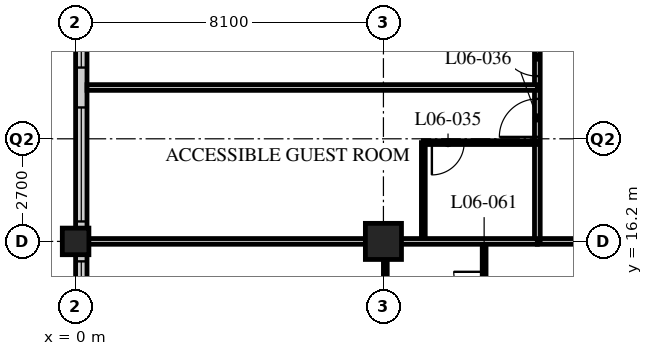
"""IFC4 building model, lengths in metres.
Left out: names, types, materials, properties, quantities, classifications, styles, units other than length and angle.
Written with IfcOpenShell. Run it as: python <this file> out.ifc"""

import sys

from ifc_helpers import new_model, si_unit, direction, frame, frame_2d, origin, origin_2d, place, context, subcontext, project, spatial, rectangle, hollow_rectangle, extrude, element, fill, save


model = new_model("IFC4")
c1 = context("Model", 3, precision=1e-05, world=origin(), true_north=direction((0.0, 1.0)))
c2 = subcontext(c1, "Body", "Model", "MODEL_VIEW")
j1 = project(units=[si_unit("LENGTHUNIT", "METRE"), si_unit("PLANEANGLEUNIT", "RADIAN")], contexts=[c1])
p1 = place(None, origin())
s1 = spatial("IfcSite", under=j1, at=p1, CompositionType="ELEMENT")
p2 = place(p1, origin())
s2 = spatial("IfcBuilding", under=s1, at=p2, CompositionType="ELEMENT")
p3 = place(p2, frame((0.0, 0.0, 33.0)))
s3 = spatial("IfcBuildingStorey", under=s2, at=p3, CompositionType="ELEMENT", Elevation=33.0)
p4 = place(p3, frame((0.0, 16.2, 0.0), z_axis=(0.0, 0.0, 1.0), x_axis=(1.0, 0.0, 0.0)))
e1 = element("IfcColumn", 1, at=p4, inside=s3, PredefinedType="COLUMN", context=c2, shape_type="SweptSolid", body=[
    extrude(hollow_rectangle(XDim=0.7, YDim=0.7, WallThickness=0.06, at=origin_2d()), origin(), (0.0, 0.0, 1.0), 3.4),
])
p5 = place(p3, frame((8.1, 16.2, 0.0), z_axis=(0.0, 0.0, 1.0), x_axis=(1.0, 0.0, 0.0)))
e2 = element("IfcColumn", 2, at=p5, inside=s3, PredefinedType="COLUMN", context=c2, shape_type="SweptSolid", body=[
    extrude(hollow_rectangle(XDim=0.95, YDim=0.95, WallThickness=0.095, at=origin_2d()), origin(), (0.0, 0.0, 1.0), 3.4),
])
p6 = place(p3, frame((0.15, 40.2, 0.0), z_axis=(0.0, 0.0, 1.0), x_axis=(0.0, -1.0, 0.0)))
e3 = element("IfcWall", 3, at=p6, inside=s3, PredefinedType="SOLIDWALL", context=c2, shape_type="SweptSolid", body=[
    extrude(rectangle(XDim=32.1, YDim=0.3, at=frame_2d((16.05, 0.0))), origin(), (0.0, 0.0, 1.0), 3.19),
])
p7 = place(p6, frame((0.225, 0.0, 0.9)))
e4 = element("IfcOpeningElement", 4, at=p7, cuts=e3, PredefinedType="OPENING", context=c2, shape_type="SweptSolid", body=[
    extrude(rectangle(XDim=3.0, YDim=2.0, at=frame_2d((1.5, 1.0))), frame((0.0, 0.16, 0.0), z_axis=(0.0, -1.0, 0.0), x_axis=(1.0, 0.0, 0.0)), (0.0, 0.0, 1.0), 0.32),
])
p8 = place(p6, frame((4.275, 0.0, 0.9)))
e5 = element("IfcOpeningElement", 5, at=p8, cuts=e3, PredefinedType="OPENING", context=c2, shape_type="SweptSolid", body=[
    extrude(rectangle(XDim=3.0, YDim=2.0, at=frame_2d((1.5, 1.0))), frame((0.0, 0.16, 0.0), z_axis=(0.0, -1.0, 0.0), x_axis=(1.0, 0.0, 0.0)), (0.0, 0.0, 1.0), 0.32),
])
p9 = place(p6, frame((8.325, 0.0, 0.9)))
e6 = element("IfcOpeningElement", 6, at=p9, cuts=e3, PredefinedType="OPENING", context=c2, shape_type="SweptSolid", body=[
    extrude(rectangle(XDim=3.0, YDim=2.0, at=frame_2d((1.5, 1.0))), frame((0.0, 0.16, 0.0), z_axis=(0.0, -1.0, 0.0), x_axis=(1.0, 0.0, 0.0)), (0.0, 0.0, 1.0), 0.32),
])
p10 = place(p6, frame((12.375, 0.0, 0.9)))
e7 = element("IfcOpeningElement", 7, at=p10, cuts=e3, PredefinedType="OPENING", context=c2, shape_type="SweptSolid", body=[
    extrude(rectangle(XDim=3.0, YDim=2.0, at=frame_2d((1.5, 1.0))), frame((0.0, 0.16, 0.0), z_axis=(0.0, -1.0, 0.0), x_axis=(1.0, 0.0, 0.0)), (0.0, 0.0, 1.0), 0.32),
])
p11 = place(p6, frame((16.425, 0.0, 0.9)))
e8 = element("IfcOpeningElement", 8, at=p11, cuts=e3, PredefinedType="OPENING", context=c2, shape_type="SweptSolid", body=[
    extrude(rectangle(XDim=3.0, YDim=2.0, at=frame_2d((1.5, 1.0))), frame((0.0, 0.16, 0.0), z_axis=(0.0, -1.0, 0.0), x_axis=(1.0, 0.0, 0.0)), (0.0, 0.0, 1.0), 0.32),
])
p12 = place(p6, frame((20.475, 0.0, 0.9)))
e9 = element("IfcOpeningElement", 9, at=p12, cuts=e3, PredefinedType="OPENING", context=c2, shape_type="SweptSolid", body=[
    extrude(rectangle(XDim=3.0, YDim=2.0, at=frame_2d((1.5, 1.0))), frame((0.0, 0.16, 0.0), z_axis=(0.0, -1.0, 0.0), x_axis=(1.0, 0.0, 0.0)), (0.0, 0.0, 1.0), 0.32),
])
p13 = place(p6, frame((24.525, 0.0, 0.9)))
e10 = element("IfcOpeningElement", 10, at=p13, cuts=e3, PredefinedType="OPENING", context=c2, shape_type="SweptSolid", body=[
    extrude(rectangle(XDim=3.0, YDim=2.0, at=frame_2d((1.5, 1.0))), frame((0.0, 0.16, 0.0), z_axis=(0.0, -1.0, 0.0), x_axis=(1.0, 0.0, 0.0)), (0.0, 0.0, 1.0), 0.32),
])
p14 = place(p6, frame((28.575, 0.0, 0.9)))
e11 = element("IfcOpeningElement", 11, at=p14, cuts=e3, PredefinedType="OPENING", context=c2, shape_type="SweptSolid", body=[
    extrude(rectangle(XDim=3.0, YDim=2.0, at=frame_2d((1.5, 1.0))), frame((0.0, 0.16, 0.0), z_axis=(0.0, -1.0, 0.0), x_axis=(1.0, 0.0, 0.0)), (0.0, 0.0, 1.0), 0.32),
])
p15 = place(p3, frame((12.15, 16.2, 0.0), z_axis=(0.0, 0.0, 1.0), x_axis=(1.0, 0.0, 0.0)))
e12 = element("IfcWall", 12, at=p15, inside=s3, PredefinedType="PARTITIONING", context=c2, shape_type="SweptSolid", body=[
    extrude(rectangle(XDim=32.4, YDim=0.15, at=frame_2d((16.2, 0.0))), origin(), (0.0, 0.0, 1.0), 2.578),
])
p16 = place(p15, frame((6.5, 0.0, 0.0)))
e13 = element("IfcOpeningElement", 13, at=p16, cuts=e12, PredefinedType="OPENING", context=c2, shape_type="SweptSolid", body=[
    extrude(rectangle(XDim=1.0, YDim=2.1, at=frame_2d((0.5, 1.05))), frame((0.0, 0.085, 0.0), z_axis=(0.0, -1.0, 0.0), x_axis=(1.0, 0.0, 0.0)), (0.0, 0.0, 1.0), 0.17),
])
p17 = place(p15, frame((8.4, 0.0, 0.0)))
e14 = element("IfcOpeningElement", 14, at=p17, cuts=e12, PredefinedType="OPENING", context=c2, shape_type="SweptSolid", body=[
    extrude(rectangle(XDim=1.0, YDim=2.1, at=frame_2d((0.5, 1.05))), frame((0.0, 0.085, 0.0), z_axis=(0.0, -1.0, 0.0), x_axis=(1.0, 0.0, 0.0)), (0.0, 0.0, 1.0), 0.17),
])
p18 = place(p15, frame((14.6, 0.0, 0.0)))
e15 = element("IfcOpeningElement", 15, at=p18, cuts=e12, PredefinedType="OPENING", context=c2, shape_type="SweptSolid", body=[
    extrude(rectangle(XDim=1.0, YDim=2.1, at=frame_2d((0.5, 1.05))), frame((0.0, 0.085, 0.0), z_axis=(0.0, -1.0, 0.0), x_axis=(1.0, 0.0, 0.0)), (0.0, 0.0, 1.0), 0.17),
])
p19 = place(p15, frame((16.5, 0.0, 0.0)))
e16 = element("IfcOpeningElement", 16, at=p19, cuts=e12, PredefinedType="OPENING", context=c2, shape_type="SweptSolid", body=[
    extrude(rectangle(XDim=1.0, YDim=2.1, at=frame_2d((0.5, 1.05))), frame((0.0, 0.085, 0.0), z_axis=(0.0, -1.0, 0.0), x_axis=(1.0, 0.0, 0.0)), (0.0, 0.0, 1.0), 0.17),
])
p20 = place(p15, frame((23.0, 0.0, 0.0)))
e17 = element("IfcOpeningElement", 17, at=p20, cuts=e12, PredefinedType="OPENING", context=c2, shape_type="SweptSolid", body=[
    extrude(rectangle(XDim=1.0, YDim=2.1, at=frame_2d((0.5, 1.05))), frame((0.0, 0.085, 0.0), z_axis=(0.0, -1.0, 0.0), x_axis=(1.0, 0.0, 0.0)), (0.0, 0.0, 1.0), 0.17),
])
p21 = place(p15, frame((24.6, 0.0, 0.0)))
e18 = element("IfcOpeningElement", 18, at=p21, cuts=e12, PredefinedType="OPENING", context=c2, shape_type="SweptSolid", body=[
    extrude(rectangle(XDim=1.0, YDim=2.1, at=frame_2d((0.5, 1.05))), frame((0.0, 0.085, 0.0), z_axis=(0.0, -1.0, 0.0), x_axis=(1.0, 0.0, 0.0)), (0.0, 0.0, 1.0), 0.17),
])
p22 = place(p15, frame((1.525, 0.0, 0.0)))
e19 = element("IfcOpeningElement", 19, at=p22, cuts=e12, PredefinedType="OPENING", context=c2, shape_type="SweptSolid", body=[
    extrude(rectangle(XDim=1.0, YDim=2.1, at=frame_2d((0.5, 1.05))), frame((0.0, 0.085, 0.0), z_axis=(0.0, -1.0, 0.0), x_axis=(1.0, 0.0, 0.0)), (0.0, 0.0, 1.0), 0.17),
])
p23 = place(p15, frame((29.875, 0.0, 0.0)))
e20 = element("IfcOpeningElement", 20, at=p23, cuts=e12, PredefinedType="OPENING", context=c2, shape_type="SweptSolid", body=[
    extrude(rectangle(XDim=1.0, YDim=2.1, at=frame_2d((0.5, 1.05))), frame((0.0, 0.085, 0.0), z_axis=(0.0, -1.0, 0.0), x_axis=(1.0, 0.0, 0.0)), (0.0, 0.0, 1.0), 0.17),
])
p24 = place(p3, frame((12.15, 16.2, 0.0), z_axis=(0.0, 0.0, 1.0), x_axis=(0.0, 1.0, 0.0)))
e21 = element("IfcWall", 21, at=p24, inside=s3, PredefinedType="PARTITIONING", context=c2, shape_type="SweptSolid", body=[
    extrude(rectangle(XDim=26.1, YDim=0.15, at=frame_2d((13.05, 0.0))), origin(), (0.0, 0.0, 1.0), 3.19),
])
p25 = place(p24, frame((2.75, 0.0, 0.0)))
e22 = element("IfcOpeningElement", 22, at=p25, cuts=e21, PredefinedType="OPENING", context=c2, shape_type="SweptSolid", body=[
    extrude(rectangle(XDim=1.0, YDim=2.1, at=frame_2d((0.5, 1.05))), frame((0.0, 0.085, 0.0), z_axis=(0.0, -1.0, 0.0), x_axis=(1.0, 0.0, 0.0)), (0.0, 0.0, 1.0), 0.17),
])
p26 = place(p24, frame((4.35, 0.0, 0.0)))
e23 = element("IfcOpeningElement", 23, at=p26, cuts=e21, PredefinedType="OPENING", context=c2, shape_type="SweptSolid", body=[
    extrude(rectangle(XDim=1.0, YDim=2.1, at=frame_2d((0.5, 1.05))), frame((0.0, 0.085, 0.0), z_axis=(0.0, -1.0, 0.0), x_axis=(1.0, 0.0, 0.0)), (0.0, 0.0, 1.0), 0.17),
])
p27 = place(p24, frame((10.55, 0.0, 0.0)))
e24 = element("IfcOpeningElement", 24, at=p27, cuts=e21, PredefinedType="OPENING", context=c2, shape_type="SweptSolid", body=[
    extrude(rectangle(XDim=1.0, YDim=2.1, at=frame_2d((0.5, 1.05))), frame((0.0, 0.085, 0.0), z_axis=(0.0, -1.0, 0.0), x_axis=(1.0, 0.0, 0.0)), (0.0, 0.0, 1.0), 0.17),
])
p28 = place(p24, frame((12.45, 0.0, 0.0)))
e25 = element("IfcOpeningElement", 25, at=p28, cuts=e21, PredefinedType="OPENING", context=c2, shape_type="SweptSolid", body=[
    extrude(rectangle(XDim=1.0, YDim=2.1, at=frame_2d((0.5, 1.05))), frame((0.0, 0.085, 0.0), z_axis=(0.0, -1.0, 0.0), x_axis=(1.0, 0.0, 0.0)), (0.0, 0.0, 1.0), 0.17),
])
p29 = place(p24, frame((18.65, 0.0, 0.0)))
e26 = element("IfcOpeningElement", 26, at=p29, cuts=e21, PredefinedType="OPENING", context=c2, shape_type="SweptSolid", body=[
    extrude(rectangle(XDim=1.0, YDim=2.1, at=frame_2d((0.5, 1.05))), frame((0.0, 0.085, 0.0), z_axis=(0.0, -1.0, 0.0), x_axis=(1.0, 0.0, 0.0)), (0.0, 0.0, 1.0), 0.17),
])
p30 = place(p24, frame((22.65, 0.0, 0.0)))
e27 = element("IfcOpeningElement", 27, at=p30, cuts=e21, PredefinedType="OPENING", context=c2, shape_type="SweptSolid", body=[
    extrude(rectangle(XDim=1.0, YDim=2.1, at=frame_2d((0.5, 1.05))), frame((0.0, 0.085, 0.0), z_axis=(0.0, -1.0, 0.0), x_axis=(1.0, 0.0, 0.0)), (0.0, 0.0, 1.0), 0.17),
])
p31 = place(p3, frame((9.15, 16.2, 0.0), z_axis=(0.0, 0.0, 1.0), x_axis=(0.0, 1.0, 0.0)))
e28 = element("IfcWall", 28, at=p31, inside=s3, PredefinedType="PARTITIONING", context=c2, shape_type="SweptSolid", body=[
    extrude(rectangle(XDim=2.6, YDim=0.1, at=frame_2d((1.3, 0.0))), origin(), (0.0, 0.0, 1.0), 3.19),
])
p32 = place(p3, frame((12.15, 18.8, 0.0), z_axis=(0.0, 0.0, 1.0), x_axis=(-1.0, 0.0, 0.0)))
e29 = element("IfcWall", 29, at=p32, inside=s3, PredefinedType="PARTITIONING", context=c2, shape_type="SweptSolid", body=[
    extrude(rectangle(XDim=3.0, YDim=0.1, at=frame_2d((1.5, 0.0))), origin(), (0.0, 0.0, 1.0), 3.19),
])
p33 = place(p32, frame((1.925, 0.0, 0.0)))
e30 = element("IfcOpeningElement", 30, at=p33, cuts=e29, PredefinedType="OPENING", context=c2, shape_type="SweptSolid", body=[
    extrude(rectangle(XDim=0.85, YDim=2.1, at=frame_2d((0.425, 1.05))), frame((0.0, 0.06, 0.0), z_axis=(0.0, -1.0, 0.0), x_axis=(1.0, 0.0, 0.0)), (0.0, 0.0, 1.0), 0.12),
])
p34 = place(p3, frame((12.15, 20.25, 0.0), z_axis=(0.0, 0.0, 1.0), x_axis=(-1.0, 0.0, 0.0)))
e31 = element("IfcWall", 31, at=p34, inside=s3, PredefinedType="PARTITIONING", context=c2, shape_type="SweptSolid", body=[
    extrude(rectangle(XDim=11.85, YDim=0.15, at=frame_2d((5.925, 0.0))), origin(), (0.0, 0.0, 1.0), 3.19),
])
p35 = place(p3, frame((10.75, 16.2, 0.0), z_axis=(0.0, 0.0, 1.0), x_axis=(0.0, -1.0, 0.0)))
e32 = element("IfcWall", 32, at=p35, inside=s3, PredefinedType="PARTITIONING", context=c2, shape_type="SweptSolid", body=[
    extrude(rectangle(XDim=2.4, YDim=0.1, at=frame_2d((1.2, 0.0))), origin(), (0.0, 0.0, 1.0), 3.19),
])
p36 = place(p35, frame((0.8, 0.0, 0.0)))
e33 = element("IfcOpeningElement", 33, at=p36, cuts=e32, PredefinedType="OPENING", context=c2, shape_type="SweptSolid", body=[
    extrude(rectangle(XDim=0.8, YDim=2.1, at=frame_2d((0.4, 1.05))), frame((0.0, 0.06, 0.0), z_axis=(0.0, -1.0, 0.0), x_axis=(1.0, 0.0, 0.0)), (0.0, 0.0, 1.0), 0.12),
])
p37 = place(p3, frame((8.15, 16.2, 0.0), z_axis=(0.0, 0.0, 1.0), x_axis=(0.0, -1.0, 0.0)))
e34 = element("IfcWall", 34, at=p37, inside=s3, PredefinedType="PARTITIONING", context=c2, shape_type="SweptSolid", body=[
    extrude(rectangle(XDim=2.4, YDim=0.1, at=frame_2d((1.2, 0.0))), origin(), (0.0, 0.0, 1.0), 2.578),
])
p38 = place(p3, frame((0.3, 16.2, 0.0), z_axis=(0.0, 0.0, 1.0), x_axis=(1.0, 0.0, 0.0)))
e35 = element("IfcWall", 35, at=p38, inside=s3, PredefinedType="PARTITIONING", context=c2, shape_type="SweptSolid", body=[
    extrude(rectangle(XDim=11.85, YDim=0.15, at=frame_2d((5.925, 0.0))), origin(), (0.0, 0.0, 1.0), 2.578),
])
p39 = place(p11, origin())
e36 = element("IfcWindow", 36, at=p39, inside=s3, PartitioningType="SINGLE_PANEL", PredefinedType="WINDOW", context=c2, shape_type="SweptSolid", body=[
    extrude(rectangle(XDim=3.0, YDim=2.0, at=frame_2d((1.5, 1.0))), frame((0.0, 0.03, 0.0), z_axis=(0.0, -1.0, 0.0), x_axis=(1.0, 0.0, 0.0)), (0.0, 0.0, 1.0), 0.06),
])
fill(e8, e36)
p40 = place(p12, origin())
e37 = element("IfcWindow", 37, at=p40, inside=s3, PartitioningType="SINGLE_PANEL", PredefinedType="WINDOW", context=c2, shape_type="SweptSolid", body=[
    extrude(rectangle(XDim=3.0, YDim=2.0, at=frame_2d((1.5, 1.0))), frame((0.0, 0.03, 0.0), z_axis=(0.0, -1.0, 0.0), x_axis=(1.0, 0.0, 0.0)), (0.0, 0.0, 1.0), 0.06),
])
fill(e9, e37)
p41 = place(p13, origin())
e38 = element("IfcWindow", 38, at=p41, inside=s3, PartitioningType="SINGLE_PANEL", PredefinedType="WINDOW", context=c2, shape_type="SweptSolid", body=[
    extrude(rectangle(XDim=3.0, YDim=2.0, at=frame_2d((1.5, 1.0))), frame((0.0, 0.03, 0.0), z_axis=(0.0, -1.0, 0.0), x_axis=(1.0, 0.0, 0.0)), (0.0, 0.0, 1.0), 0.06),
])
fill(e10, e38)
p42 = place(p33, origin())
e39 = element("IfcDoor", 39, at=p42, inside=s3, OperationType="SINGLE_SWING_RIGHT", PredefinedType="DOOR", context=c2, shape_type="SweptSolid", body=[
    extrude(rectangle(XDim=0.85, YDim=2.1, at=frame_2d((0.425, 1.05))), frame((0.0, 0.025, 0.0), z_axis=(0.0, -1.0, 0.0), x_axis=(1.0, 0.0, 0.0)), (0.0, 0.0, 1.0), 0.05),
])
fill(e30, e39)
p43 = place(p25, origin())
e40 = element("IfcDoor", 40, at=p43, inside=s3, OperationType="SINGLE_SWING_LEFT", PredefinedType="DOOR", context=c2, shape_type="SweptSolid", body=[
    extrude(rectangle(XDim=1.0, YDim=2.1, at=frame_2d((0.5, 1.05))), frame((0.0, 0.025, 0.0), z_axis=(0.0, -1.0, 0.0), x_axis=(1.0, 0.0, 0.0)), (0.0, 0.0, 1.0), 0.05),
])
fill(e22, e40)
p44 = place(p26, origin())
e41 = element("IfcDoor", 41, at=p44, inside=s3, OperationType="SINGLE_SWING_RIGHT", PredefinedType="DOOR", context=c2, shape_type="SweptSolid", body=[
    extrude(rectangle(XDim=1.0, YDim=2.1, at=frame_2d((0.5, 1.05))), frame((0.0, 0.025, 0.0), z_axis=(0.0, -1.0, 0.0), x_axis=(1.0, 0.0, 0.0)), (0.0, 0.0, 1.0), 0.05),
])
fill(e23, e41)
p45 = place(p36, origin())
e42 = element("IfcDoor", 42, at=p45, inside=s3, OperationType="SINGLE_SWING_RIGHT", PredefinedType="DOOR", context=c2, shape_type="SweptSolid", body=[
    extrude(rectangle(XDim=0.8, YDim=2.1, at=frame_2d((0.4, 1.05))), frame((0.0, 0.025, 0.0), z_axis=(0.0, -1.0, 0.0), x_axis=(1.0, 0.0, 0.0)), (0.0, 0.0, 1.0), 0.05),
])
fill(e33, e42)
save(model, sys.argv[1])
